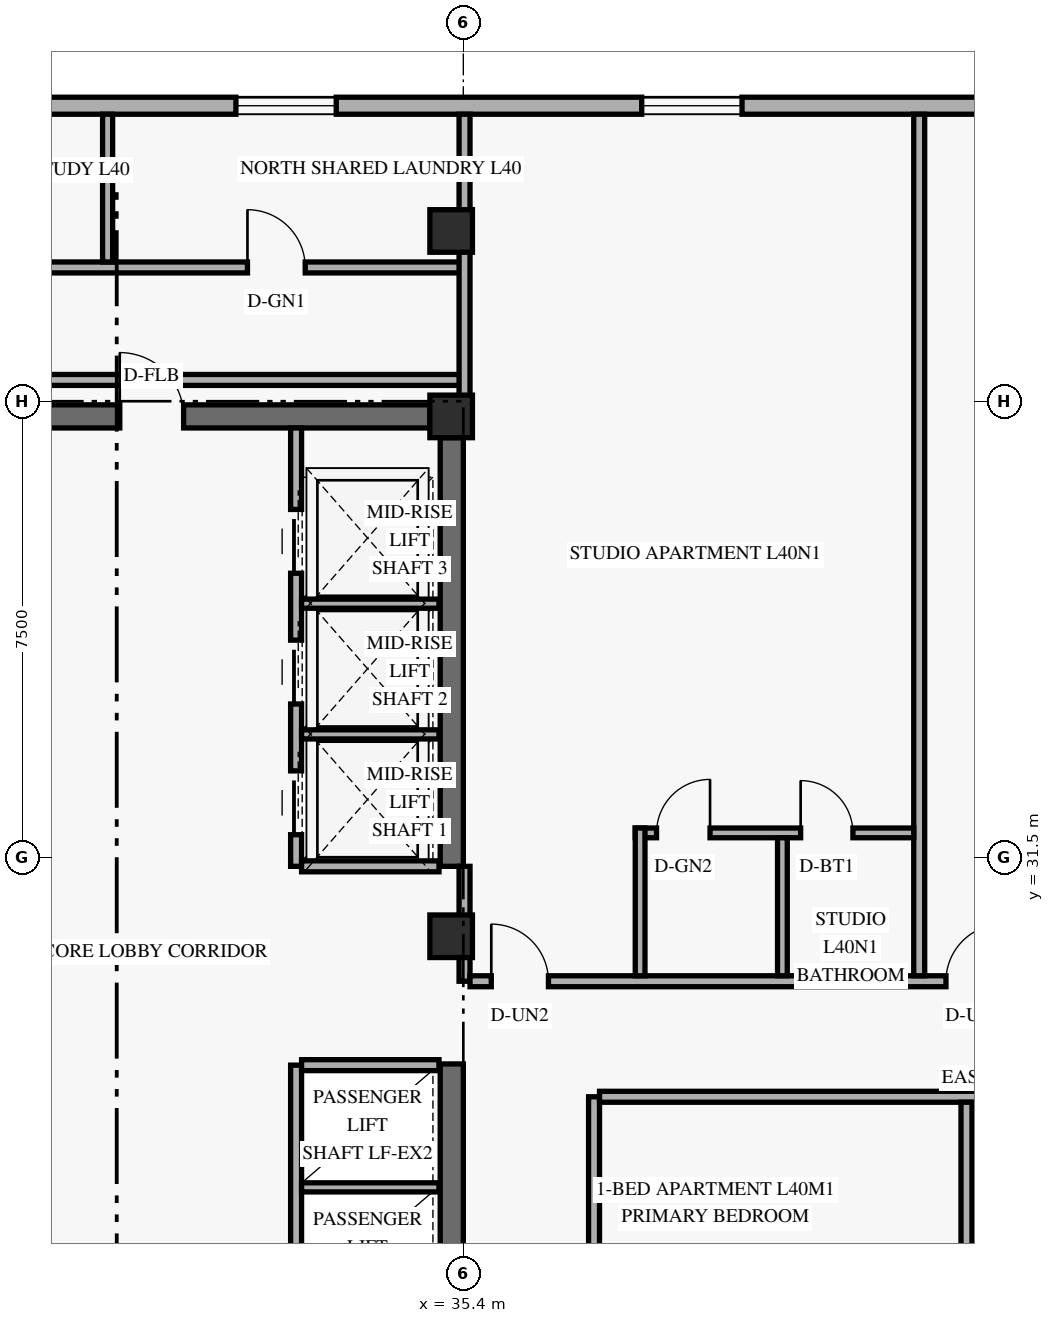
"""IFC4 building model, lengths in metres.
Left out: names, types, materials, properties, quantities, classifications, styles, units other than length and angle.
Written with IfcOpenShell. Run it as: python <this file> out.ifc"""

import sys

from ifc_helpers import new_model, si_unit, direction, frame, frame_2d, origin, origin_2d, place, context, subcontext, project, spatial, rectangle, extrude, element, fill, save


model = new_model("IFC4")
c1 = context("Model", 3, precision=1e-05, world=origin(), true_north=direction((0.0, 1.0)))
c2 = subcontext(c1, "Body", "Model", "MODEL_VIEW")
j1 = project(units=[si_unit("LENGTHUNIT", "METRE"), si_unit("PLANEANGLEUNIT", "RADIAN")], contexts=[c1])
p1 = place(None, origin())
s1 = spatial("IfcSite", under=j1, at=p1, CompositionType="ELEMENT")
p2 = place(p1, origin())
s2 = spatial("IfcBuilding", under=s1, at=p2, CompositionType="ELEMENT")
p3 = place(p2, frame((0.0, 0.0, 155.4)))
s3 = spatial("IfcBuildingStorey", under=s2, at=p3, CompositionType="ELEMENT", Elevation=155.4)
p4 = place(p3, frame((35.21, 17.9, 0.0), z_axis=(0.0, 0.0, 1.0), x_axis=(0.0, 1.0, 0.0)))
e1 = element("IfcWall", 1, at=p4, inside=s3, PredefinedType="SHEAR", context=c2, shape_type="SweptSolid", body=[
    extrude(rectangle(XDim=10.2, YDim=0.38, at=frame_2d((5.1, 0.0))), origin(), (0.0, 0.0, 1.0), 2.748),
])
p5 = place(p3, frame((35.21, 31.35, 0.0), z_axis=(0.0, 0.0, 1.0), x_axis=(0.0, 1.0, 0.0)))
e2 = element("IfcWall", 2, at=p5, inside=s3, PredefinedType="SHEAR", context=c2, shape_type="SweptSolid", body=[
    extrude(rectangle(XDim=7.05, YDim=0.38, at=frame_2d((3.525, 0.0))), origin(), (0.0, 0.0, 1.0), 2.748),
])
p6 = place(p3, frame((24.55, 38.75, 0.0), z_axis=(0.0, 0.0, 1.0), x_axis=(1.0, 0.0, 0.0)))
e3 = element("IfcWall", 3, at=p6, inside=s3, PredefinedType="SHEAR", context=c2, shape_type="SweptSolid", body=[
    extrude(rectangle(XDim=10.3, YDim=0.38, at=frame_2d((5.15, 0.0))), origin(), (0.0, 0.0, 1.0), 3.36),
])
p7 = place(p6, frame((5.2, 0.0, 0.0)))
e4 = element("IfcOpeningElement", 4, at=p7, cuts=e3, PredefinedType="OPENING", context=c2, shape_type="SweptSolid", body=[
    extrude(rectangle(XDim=1.05, YDim=2.15, at=frame_2d((0.525, 1.075))), frame((0.0, 0.2, 0.0), z_axis=(0.0, -1.0, 0.0), x_axis=(1.0, 0.0, 0.0)), (0.0, 0.0, 1.0), 0.4),
])
for number, where, z_axis, x_axis in (
    (5, (35.2, 30.2, 0.0), (0.0, 0.0, 1.0), (1.0, 0.0, 0.0)),
    (6, (35.2, 38.75, 0.0), (0.0, 0.0, 1.0), (1.0, 0.0, 0.0)),
    (7, (35.2, 41.8, 0.0), (0.0, 0.0, 1.0), (1.0, 0.0, 0.0)),
):
    element("IfcColumn", number, at=place(p3, frame(where, z_axis=z_axis, x_axis=x_axis)), inside=s3, PredefinedType="COLUMN", context=c2, shape_type="SweptSolid", body=[
        extrude(rectangle(XDim=0.7, YDim=0.7, at=origin_2d()), origin(), (0.0, 0.0, 1.0), 3.6),
    ])
p8 = place(p3, frame((54.98, 43.86, 0.0), z_axis=(0.0, 0.0, 1.0), x_axis=(-1.0, 0.0, 0.0)))
e8 = element("IfcWall", 8, at=p8, inside=s3, PredefinedType="SOLIDWALL", context=c2, shape_type="SweptSolid", body=[
    extrude(rectangle(XDim=33.76, YDim=0.28, at=frame_2d((16.88, 0.0))), origin(), (0.0, 0.0, 1.0), 3.36),
])
p9 = place(p8, frame((28.555, 0.0, 0.85)))
e9 = element("IfcOpeningElement", 9, at=p9, cuts=e8, PredefinedType="OPENING", context=c2, shape_type="SweptSolid", body=[
    extrude(rectangle(XDim=1.65, YDim=1.6, at=frame_2d((0.825, 0.8))), frame((0.0, 0.15, 0.0), z_axis=(0.0, -1.0, 0.0), x_axis=(1.0, 0.0, 0.0)), (0.0, 0.0, 1.0), 0.3),
])
p10 = place(p8, frame((21.67, 0.0, 0.85)))
e10 = element("IfcOpeningElement", 10, at=p10, cuts=e8, PredefinedType="OPENING", context=c2, shape_type="SweptSolid", body=[
    extrude(rectangle(XDim=1.65, YDim=1.6, at=frame_2d((0.825, 0.8))), frame((0.0, 0.15, 0.0), z_axis=(0.0, -1.0, 0.0), x_axis=(1.0, 0.0, 0.0)), (0.0, 0.0, 1.0), 0.3),
])
p11 = place(p8, frame((14.996, 0.0, 0.85)))
e11 = element("IfcOpeningElement", 11, at=p11, cuts=e8, PredefinedType="OPENING", context=c2, shape_type="SweptSolid", body=[
    extrude(rectangle(XDim=1.65, YDim=1.6, at=frame_2d((0.825, 0.8))), frame((0.0, 0.15, 0.0), z_axis=(0.0, -1.0, 0.0), x_axis=(1.0, 0.0, 0.0)), (0.0, 0.0, 1.0), 0.3),
])
p12 = place(p8, frame((7.806, 0.0, 0.85)))
e12 = element("IfcOpeningElement", 12, at=p12, cuts=e8, PredefinedType="OPENING", context=c2, shape_type="SweptSolid", body=[
    extrude(rectangle(XDim=1.65, YDim=1.6, at=frame_2d((0.825, 0.8))), frame((0.0, 0.15, 0.0), z_axis=(0.0, -1.0, 0.0), x_axis=(1.0, 0.0, 0.0)), (0.0, 0.0, 1.0), 0.3),
])
p13 = place(p8, frame((1.765, 0.0, 0.85)))
e13 = element("IfcOpeningElement", 13, at=p13, cuts=e8, PredefinedType="OPENING", context=c2, shape_type="SweptSolid", body=[
    extrude(rectangle(XDim=1.65, YDim=1.6, at=frame_2d((0.825, 0.8))), frame((0.0, 0.15, 0.0), z_axis=(0.0, -1.0, 0.0), x_axis=(1.0, 0.0, 0.0)), (0.0, 0.0, 1.0), 0.3),
])
p14 = place(p3, frame((32.65, 18.02, 0.0), z_axis=(0.0, 0.0, 1.0), x_axis=(0.0, 1.0, 0.0)))
e14 = element("IfcWall", 14, at=p14, inside=s3, PredefinedType="STANDARD", context=c2, shape_type="SweptSolid", body=[
    extrude(rectangle(XDim=10.06, YDim=0.18, at=frame_2d((5.03, 0.0))), origin(), (0.0, 0.0, 1.0), 3.36),
])
p15 = place(p3, frame((32.74, 28.08, 0.0), z_axis=(0.0, 0.0, 1.0), x_axis=(1.0, 0.0, 0.0)))
e15 = element("IfcWall", 15, at=p15, inside=s3, PredefinedType="STANDARD", context=c2, shape_type="SweptSolid", body=[
    extrude(rectangle(XDim=2.26, YDim=0.18, at=frame_2d((1.13, 0.0))), origin(), (0.0, 0.0, 1.0), 3.36),
])
p16 = place(p3, frame((32.74, 26.07, 0.0), z_axis=(0.0, 0.0, 1.0), x_axis=(1.0, 0.0, 0.0)))
e16 = element("IfcWall", 16, at=p16, inside=s3, PredefinedType="STANDARD", context=c2, shape_type="SweptSolid", body=[
    extrude(rectangle(XDim=2.26, YDim=0.15, at=frame_2d((1.13, 0.0))), origin(), (0.0, 0.0, 1.0), 3.36),
])
p17 = place(p3, frame((32.65, 31.35, 0.0), z_axis=(0.0, 0.0, 1.0), x_axis=(0.0, 1.0, 0.0)))
e17 = element("IfcWall", 17, at=p17, inside=s3, PredefinedType="STANDARD", context=c2, shape_type="SweptSolid", body=[
    extrude(rectangle(XDim=7.21, YDim=0.18, at=frame_2d((3.605, 0.0))), origin(), (0.0, 0.0, 1.0), 3.36),
])
p18 = place(p17, frame((0.52, 0.0, 0.0)))
e18 = element("IfcOpeningElement", 18, at=p18, cuts=e17, PredefinedType="OPENING", context=c2, shape_type="SweptSolid", body=[
    extrude(rectangle(XDim=1.05, YDim=2.2, at=frame_2d((0.525, 1.1))), frame((0.0, 0.1, 0.0), z_axis=(0.0, -1.0, 0.0), x_axis=(1.0, 0.0, 0.0)), (0.0, 0.0, 1.0), 0.2),
])
p19 = place(p17, frame((2.67, 0.0, 0.0)))
e19 = element("IfcOpeningElement", 19, at=p19, cuts=e17, PredefinedType="OPENING", context=c2, shape_type="SweptSolid", body=[
    extrude(rectangle(XDim=1.05, YDim=2.2, at=frame_2d((0.525, 1.1))), frame((0.0, 0.1, 0.0), z_axis=(0.0, -1.0, 0.0), x_axis=(1.0, 0.0, 0.0)), (0.0, 0.0, 1.0), 0.2),
])
p20 = place(p17, frame((4.82, 0.0, 0.0)))
e20 = element("IfcOpeningElement", 20, at=p20, cuts=e17, PredefinedType="OPENING", context=c2, shape_type="SweptSolid", body=[
    extrude(rectangle(XDim=1.05, YDim=2.2, at=frame_2d((0.525, 1.1))), frame((0.0, 0.1, 0.0), z_axis=(0.0, -1.0, 0.0), x_axis=(1.0, 0.0, 0.0)), (0.0, 0.0, 1.0), 0.2),
])
p21 = place(p3, frame((32.74, 31.35, 0.0), z_axis=(0.0, 0.0, 1.0), x_axis=(1.0, 0.0, 0.0)))
e21 = element("IfcWall", 21, at=p21, inside=s3, PredefinedType="STANDARD", context=c2, shape_type="SweptSolid", body=[
    extrude(rectangle(XDim=2.26, YDim=0.18, at=frame_2d((1.13, 0.0))), origin(), (0.0, 0.0, 1.0), 3.36),
])
for number, where, z_axis, x_axis in (
    (22, (32.74, 33.52, 0.0), (0.0, 0.0, 1.0), (1.0, 0.0, 0.0)),
    (23, (32.74, 35.67, 0.0), (0.0, 0.0, 1.0), (1.0, 0.0, 0.0)),
):
    element("IfcWall", number, at=place(p3, frame(where, z_axis=z_axis, x_axis=x_axis)), inside=s3, PredefinedType="STANDARD", context=c2, shape_type="SweptSolid", body=[
        extrude(rectangle(XDim=2.26, YDim=0.15, at=frame_2d((1.13, 0.0))), origin(), (0.0, 0.0, 1.0), 3.36),
    ])
p22 = place(p3, frame((37.55, 17.28, 0.0), z_axis=(0.0, 0.0, 1.0), x_axis=(0.0, 1.0, 0.0)))
e24 = element("IfcWall", 24, at=p22, inside=s3, PredefinedType="STANDARD", context=c2, shape_type="SweptSolid", body=[
    extrude(rectangle(XDim=10.28, YDim=0.18, at=frame_2d((5.14, 0.0))), origin(), (0.0, 0.0, 1.0), 2.73),
])
p23 = place(p22, frame((0.793, 0.0, 0.0)))
e25 = element("IfcOpeningElement", 25, at=p23, cuts=e24, PredefinedType="OPENING", context=c2, shape_type="SweptSolid", body=[
    extrude(rectangle(XDim=0.94, YDim=2.15, at=frame_2d((0.47, 1.075))), frame((0.0, 0.1, 0.0), z_axis=(0.0, -1.0, 0.0), x_axis=(1.0, 0.0, 0.0)), (0.0, 0.0, 1.0), 0.2),
])
p24 = place(p3, frame((37.64, 27.56, 0.0), z_axis=(0.0, 0.0, 1.0), x_axis=(1.0, 0.0, 0.0)))
e26 = element("IfcWall", 26, at=p24, inside=s3, PredefinedType="STANDARD", context=c2, shape_type="SweptSolid", body=[
    extrude(rectangle(XDim=12.16, YDim=0.18, at=frame_2d((6.08, 0.0))), origin(), (0.0, 0.0, 1.0), 2.73),
])
p25 = place(p3, frame((35.42, 29.46, 0.0), z_axis=(0.0, 0.0, 1.0), x_axis=(0.0, 1.0, 0.0)))
e27 = element("IfcWall", 27, at=p25, inside=s3, PredefinedType="STANDARD", context=c2, shape_type="SweptSolid", body=[
    extrude(rectangle(XDim=1.89, YDim=0.18, at=frame_2d((0.945, 0.0))), origin(), (0.0, 0.0, 1.0), 2.73),
])
p26 = place(p3, frame((35.51, 29.46, 0.0), z_axis=(0.0, 0.0, 1.0), x_axis=(1.0, 0.0, 0.0)))
e28 = element("IfcWall", 28, at=p26, inside=s3, PredefinedType="STANDARD", context=c2, shape_type="SweptSolid", body=[
    extrude(rectangle(XDim=14.29, YDim=0.18, at=frame_2d((7.145, 0.0))), origin(), (0.0, 0.0, 1.0), 2.73),
])
p27 = place(p26, frame((0.35, 0.0, 0.0)))
e29 = element("IfcOpeningElement", 29, at=p27, cuts=e28, PredefinedType="OPENING", context=c2, shape_type="SweptSolid", body=[
    extrude(rectangle(XDim=0.94, YDim=2.15, at=frame_2d((0.47, 1.075))), frame((0.0, 0.1, 0.0), z_axis=(0.0, -1.0, 0.0), x_axis=(1.0, 0.0, 0.0)), (0.0, 0.0, 1.0), 0.2),
])
p28 = place(p26, frame((7.828, 0.0, 0.0)))
e30 = element("IfcOpeningElement", 30, at=p28, cuts=e28, PredefinedType="OPENING", context=c2, shape_type="SweptSolid", body=[
    extrude(rectangle(XDim=0.94, YDim=2.15, at=frame_2d((0.47, 1.075))), frame((0.0, 0.1, 0.0), z_axis=(0.0, -1.0, 0.0), x_axis=(1.0, 0.0, 0.0)), (0.0, 0.0, 1.0), 0.2),
])
p29 = place(p3, frame((21.74, 41.2, 0.0), z_axis=(0.0, 0.0, 1.0), x_axis=(1.0, 0.0, 0.0)))
e31 = element("IfcWall", 31, at=p29, inside=s3, PredefinedType="STANDARD", context=c2, shape_type="SweptSolid", body=[
    extrude(rectangle(XDim=13.68, YDim=0.18, at=frame_2d((6.84, 0.0))), origin(), (0.0, 0.0, 1.0), 2.73),
])
p30 = place(p29, frame((2.95, 0.0, 0.0)))
e32 = element("IfcOpeningElement", 32, at=p30, cuts=e31, PredefinedType="OPENING", context=c2, shape_type="SweptSolid", body=[
    extrude(rectangle(XDim=0.95, YDim=2.15, at=frame_2d((0.475, 1.075))), frame((0.0, 0.1, 0.0), z_axis=(0.0, -1.0, 0.0), x_axis=(1.0, 0.0, 0.0)), (0.0, 0.0, 1.0), 0.2),
])
p31 = place(p29, frame((10.11, 0.0, 0.0)))
e33 = element("IfcOpeningElement", 33, at=p31, cuts=e31, PredefinedType="OPENING", context=c2, shape_type="SweptSolid", body=[
    extrude(rectangle(XDim=0.95, YDim=2.15, at=frame_2d((0.475, 1.075))), frame((0.0, 0.1, 0.0), z_axis=(0.0, -1.0, 0.0), x_axis=(1.0, 0.0, 0.0)), (0.0, 0.0, 1.0), 0.2),
])
p32 = place(p3, frame((23.85, 39.35, 0.0), z_axis=(0.0, 0.0, 1.0), x_axis=(1.0, 0.0, 0.0)))
e34 = element("IfcWall", 34, at=p32, inside=s3, PredefinedType="STANDARD", context=c2, shape_type="SweptSolid", body=[
    extrude(rectangle(XDim=11.57, YDim=0.18, at=frame_2d((5.785, 0.0))), origin(), (0.0, 0.0, 1.0), 2.73),
])
p33 = place(p3, frame((35.42, 38.75, 0.0), z_axis=(0.0, 0.0, 1.0), x_axis=(0.0, 1.0, 0.0)))
e35 = element("IfcWall", 35, at=p33, inside=s3, PredefinedType="PARTITIONING", context=c2, shape_type="SweptSolid", body=[
    extrude(rectangle(XDim=4.97, YDim=0.18, at=frame_2d((2.485, 0.0))), origin(), (0.0, 0.0, 1.0), 2.73),
])
p34 = place(p3, frame((42.898, 29.55, 0.0), z_axis=(0.0, 0.0, 1.0), x_axis=(0.0, 1.0, 0.0)))
e36 = element("IfcWall", 36, at=p34, inside=s3, PredefinedType="PARTITIONING", context=c2, shape_type="SweptSolid", body=[
    extrude(rectangle(XDim=14.17, YDim=0.18, at=frame_2d((7.085, 0.0))), origin(), (0.0, 0.0, 1.0), 2.73),
])
p35 = place(p3, frame((38.228, 31.9, 0.0), z_axis=(0.0, 0.0, 1.0), x_axis=(1.0, 0.0, 0.0)))
e37 = element("IfcWall", 37, at=p35, inside=s3, PredefinedType="PLUMBINGWALL", context=c2, shape_type="SweptSolid", body=[
    extrude(rectangle(XDim=4.58, YDim=0.16, at=frame_2d((2.29, 0.0))), origin(), (0.0, 0.0, 1.0), 3.36),
])
p36 = place(p35, frame((0.35, 0.0, 0.0)))
e38 = element("IfcOpeningElement", 38, at=p36, cuts=e37, PredefinedType="OPENING", context=c2, shape_type="SweptSolid", body=[
    extrude(rectangle(XDim=0.88, YDim=2.12, at=frame_2d((0.44, 1.06))), frame((0.0, 0.09, 0.0), z_axis=(0.0, -1.0, 0.0), x_axis=(1.0, 0.0, 0.0)), (0.0, 0.0, 1.0), 0.18),
])
p37 = place(p35, frame((2.72, 0.0, 0.0)))
e39 = element("IfcOpeningElement", 39, at=p37, cuts=e37, PredefinedType="OPENING", context=c2, shape_type="SweptSolid", body=[
    extrude(rectangle(XDim=0.86, YDim=2.12, at=frame_2d((0.43, 1.06))), frame((0.0, 0.09, 0.0), z_axis=(0.0, -1.0, 0.0), x_axis=(1.0, 0.0, 0.0)), (0.0, 0.0, 1.0), 0.18),
])
p38 = place(p3, frame((38.308, 29.55, 0.0), z_axis=(0.0, 0.0, 1.0), x_axis=(0.0, 1.0, 0.0)))
e40 = element("IfcWall", 40, at=p38, inside=s3, PredefinedType="PLUMBINGWALL", context=c2, shape_type="SweptSolid", body=[
    extrude(rectangle(XDim=2.43, YDim=0.16, at=frame_2d((1.215, 0.0))), origin(), (0.0, 0.0, 1.0), 2.73),
])
p39 = place(p3, frame((40.648, 29.55, 0.0), z_axis=(0.0, 0.0, 1.0), x_axis=(0.0, 1.0, 0.0)))
e41 = element("IfcWall", 41, at=p39, inside=s3, PredefinedType="PLUMBINGWALL", context=c2, shape_type="SweptSolid", body=[
    extrude(rectangle(XDim=2.27, YDim=0.16, at=frame_2d((1.135, 0.0))), origin(), (0.0, 0.0, 1.0), 2.73),
])
p40 = place(p3, frame((43.675, 17.37, 0.0), z_axis=(0.0, 0.0, 1.0), x_axis=(0.0, 1.0, 0.0)))
e42 = element("IfcWall", 42, at=p40, inside=s3, PredefinedType="PARTITIONING", context=c2, shape_type="SweptSolid", body=[
    extrude(rectangle(XDim=10.1, YDim=0.18, at=frame_2d((5.05, 0.0))), origin(), (0.0, 0.0, 1.0), 2.73),
])
p41 = place(p3, frame((29.55, 41.29, 0.0), z_axis=(0.0, 0.0, 1.0), x_axis=(0.0, 1.0, 0.0)))
e43 = element("IfcWall", 43, at=p41, inside=s3, PredefinedType="PARTITIONING", context=c2, shape_type="SweptSolid", body=[
    extrude(rectangle(XDim=2.43, YDim=0.165, at=frame_2d((1.215, 0.0))), origin(), (0.0, 0.0, 1.0), 2.879),
])
p42 = place(p10, origin())
e44 = element("IfcWindow", 44, at=p42, inside=s3, PartitioningType="SINGLE_PANEL", PredefinedType="WINDOW", context=c2, shape_type="SweptSolid", body=[
    extrude(rectangle(XDim=1.65, YDim=1.6, at=frame_2d((0.825, 0.8))), frame((0.0, 0.03, 0.0), z_axis=(0.0, -1.0, 0.0), x_axis=(1.0, 0.0, 0.0)), (0.0, 0.0, 1.0), 0.06),
])
fill(e10, e44)
p43 = place(p11, origin())
e45 = element("IfcWindow", 45, at=p43, inside=s3, PartitioningType="SINGLE_PANEL", PredefinedType="WINDOW", context=c2, shape_type="SweptSolid", body=[
    extrude(rectangle(XDim=1.65, YDim=1.6, at=frame_2d((0.825, 0.8))), frame((0.0, 0.03, 0.0), z_axis=(0.0, -1.0, 0.0), x_axis=(1.0, 0.0, 0.0)), (0.0, 0.0, 1.0), 0.06),
])
fill(e11, e45)
p44 = place(p18, origin())
e46 = element("IfcDoor", 46, at=p44, inside=s3, OperationType="SLIDING_TO_LEFT", PredefinedType="DOOR", context=c2, shape_type="SweptSolid", body=[
    extrude(rectangle(XDim=1.05, YDim=2.2, at=frame_2d((0.525, 1.1))), frame((0.0, 0.025, 0.0), z_axis=(0.0, -1.0, 0.0), x_axis=(1.0, 0.0, 0.0)), (0.0, 0.0, 1.0), 0.05),
])
fill(e18, e46)
p45 = place(p19, origin())
e47 = element("IfcDoor", 47, at=p45, inside=s3, OperationType="SLIDING_TO_LEFT", PredefinedType="DOOR", context=c2, shape_type="SweptSolid", body=[
    extrude(rectangle(XDim=1.05, YDim=2.2, at=frame_2d((0.525, 1.1))), frame((0.0, 0.025, 0.0), z_axis=(0.0, -1.0, 0.0), x_axis=(1.0, 0.0, 0.0)), (0.0, 0.0, 1.0), 0.05),
])
fill(e19, e47)
p46 = place(p20, origin())
e48 = element("IfcDoor", 48, at=p46, inside=s3, OperationType="SLIDING_TO_LEFT", PredefinedType="DOOR", context=c2, shape_type="SweptSolid", body=[
    extrude(rectangle(XDim=1.05, YDim=2.2, at=frame_2d((0.525, 1.1))), frame((0.0, 0.025, 0.0), z_axis=(0.0, -1.0, 0.0), x_axis=(1.0, 0.0, 0.0)), (0.0, 0.0, 1.0), 0.05),
])
fill(e20, e48)
p47 = place(p7, frame((1.05, 0.0, 0.0), z_axis=(0.0, 0.0, 1.0), x_axis=(-1.0, 0.0, 0.0)))
e49 = element("IfcDoor", 49, at=p47, inside=s3, OperationType="SINGLE_SWING_RIGHT", PredefinedType="DOOR", context=c2, shape_type="SweptSolid", body=[
    extrude(rectangle(XDim=1.05, YDim=2.15, at=frame_2d((0.525, 1.075))), frame((0.0, 0.025, 0.0), z_axis=(0.0, -1.0, 0.0), x_axis=(1.0, 0.0, 0.0)), (0.0, 0.0, 1.0), 0.05),
])
fill(e4, e49)
p48 = place(p27, origin())
e50 = element("IfcDoor", 50, at=p48, inside=s3, OperationType="SINGLE_SWING_LEFT", PredefinedType="DOOR", context=c2, shape_type="SweptSolid", body=[
    extrude(rectangle(XDim=0.94, YDim=2.15, at=frame_2d((0.47, 1.075))), frame((0.0, 0.025, 0.0), z_axis=(0.0, -1.0, 0.0), x_axis=(1.0, 0.0, 0.0)), (0.0, 0.0, 1.0), 0.05),
])
fill(e29, e50)
p49 = place(p36, origin())
e51 = element("IfcDoor", 51, at=p49, inside=s3, OperationType="SINGLE_SWING_RIGHT", PredefinedType="DOOR", context=c2, shape_type="SweptSolid", body=[
    extrude(rectangle(XDim=0.88, YDim=2.12, at=frame_2d((0.44, 1.06))), frame((0.0, 0.025, 0.0), z_axis=(0.0, -1.0, 0.0), x_axis=(1.0, 0.0, 0.0)), (0.0, 0.0, 1.0), 0.05),
])
fill(e38, e51)
p50 = place(p37, origin())
e52 = element("IfcDoor", 52, at=p50, inside=s3, OperationType="SINGLE_SWING_LEFT", PredefinedType="DOOR", context=c2, shape_type="SweptSolid", body=[
    extrude(rectangle(XDim=0.86, YDim=2.12, at=frame_2d((0.43, 1.06))), frame((0.0, 0.025, 0.0), z_axis=(0.0, -1.0, 0.0), x_axis=(1.0, 0.0, 0.0)), (0.0, 0.0, 1.0), 0.05),
])
fill(e39, e52)
p51 = place(p28, origin())
e53 = element("IfcDoor", 53, at=p51, inside=s3, OperationType="SINGLE_SWING_RIGHT", PredefinedType="DOOR", context=c2, shape_type="SweptSolid", body=[
    extrude(rectangle(XDim=0.94, YDim=2.15, at=frame_2d((0.47, 1.075))), frame((0.0, 0.025, 0.0), z_axis=(0.0, -1.0, 0.0), x_axis=(1.0, 0.0, 0.0)), (0.0, 0.0, 1.0), 0.05),
])
fill(e30, e53)
p52 = place(p31, origin())
e54 = element("IfcDoor", 54, at=p52, inside=s3, OperationType="SINGLE_SWING_LEFT", PredefinedType="DOOR", context=c2, shape_type="SweptSolid", body=[
    extrude(rectangle(XDim=0.95, YDim=2.15, at=frame_2d((0.475, 1.075))), frame((0.0, 0.025, 0.0), z_axis=(0.0, -1.0, 0.0), x_axis=(1.0, 0.0, 0.0)), (0.0, 0.0, 1.0), 0.05),
])
fill(e33, e54)
save(model, sys.argv[1])
